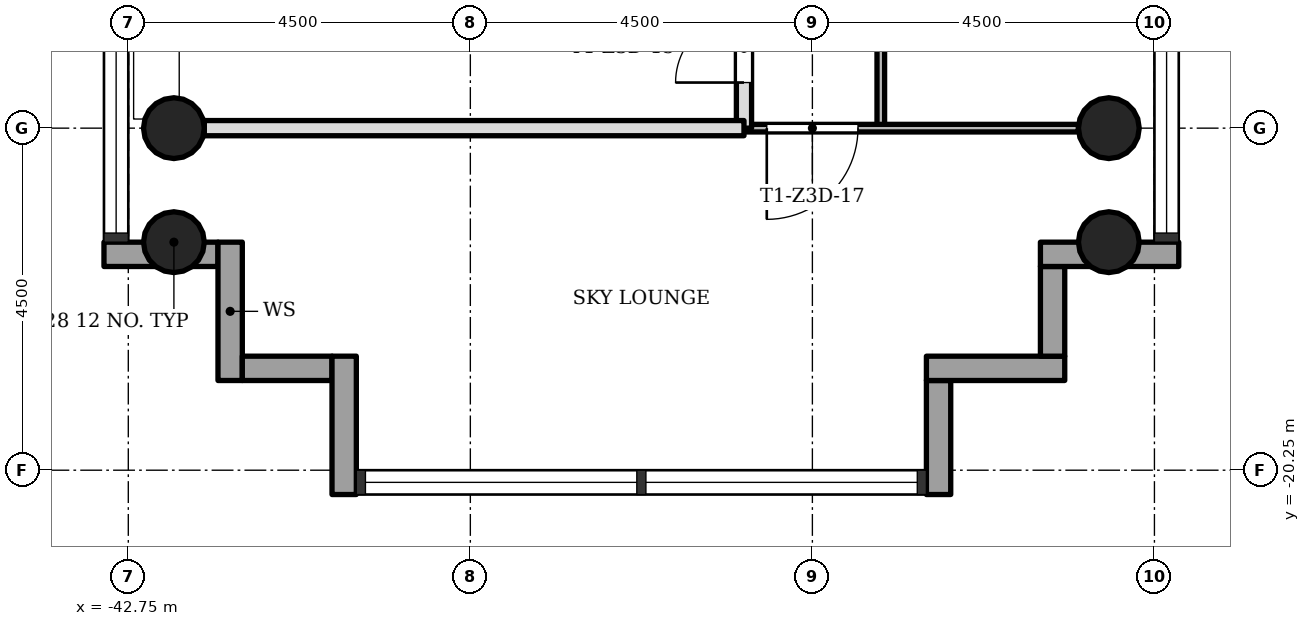
"""IFC4 building model, lengths in metres.
Left out: names, types, materials, properties, quantities, classifications, styles, units other than length and angle.
Written with IfcOpenShell. Run it as: python <this file> out.ifc"""

import sys

from ifc_helpers import new_model, si_unit, direction, frame, frame_2d, origin, origin_2d, place, context, subcontext, project, spatial, rectangle, hollow_circle, extrude, element, fill, save


model = new_model("IFC4")
c1 = context("Model", 3, precision=1e-05, world=origin(), true_north=direction((0.0, 1.0)))
c2 = subcontext(c1, "Body", "Model", "MODEL_VIEW")
j1 = project(units=[si_unit("LENGTHUNIT", "METRE"), si_unit("PLANEANGLEUNIT", "RADIAN")], contexts=[c1])
p1 = place(None, origin())
s1 = spatial("IfcSite", under=j1, at=p1, CompositionType="ELEMENT")
p2 = place(p1, origin())
s2 = spatial("IfcBuilding", under=s1, at=p2, CompositionType="ELEMENT")
p3 = place(p2, frame((0.0, 0.0, 174.5)))
s3 = spatial("IfcBuildingStorey", under=s2, at=p3, CompositionType="ELEMENT", Elevation=174.5)
for number, where, z_axis, x_axis in (
    (1, (-42.15, -15.75, 0.0), (0.0, 0.0, 1.0), (1.0, 0.0, 0.0)),
    (2, (-29.85, -15.75, 0.0), (0.0, 0.0, 1.0), (1.0, 0.0, 0.0)),
    (3, (-42.15, -17.25, 0.0), (0.0, 0.0, 1.0), (1.0, 0.0, 0.0)),
    (4, (-29.85, -17.25, 0.0), (0.0, 0.0, 1.0), (1.0, 0.0, 0.0)),
):
    element("IfcColumn", number, at=place(p3, frame(where, z_axis=z_axis, x_axis=x_axis)), inside=s3, PredefinedType="COLUMN", context=c2, shape_type="SweptSolid", body=[
        extrude(hollow_circle(Radius=0.4, WallThickness=0.028, at=origin_2d()), origin(), (0.0, 0.0, 1.0), 3.4),
    ])
p4 = place(p3, frame((-43.07, -17.41, -0.3), z_axis=(0.0, 0.0, 1.0), x_axis=(1.0, 0.0, 0.0)))
e5 = element("IfcWall", 5, at=p4, inside=s3, PredefinedType="STANDARD", context=c2, shape_type="SweptSolid", body=[
    extrude(rectangle(XDim=1.5, YDim=0.32, at=frame_2d((0.75, 0.0))), origin(), (0.0, 0.0, 1.0), 3.4),
])
p5 = place(p3, frame((-41.41, -17.25, -0.3), z_axis=(0.0, 0.0, 1.0), x_axis=(0.0, -1.0, 0.0)))
e6 = element("IfcWall", 6, at=p5, inside=s3, PredefinedType="STANDARD", context=c2, shape_type="SweptSolid", body=[
    extrude(rectangle(XDim=1.82, YDim=0.32, at=frame_2d((0.91, 0.0))), origin(), (0.0, 0.0, 1.0), 3.4),
])
p6 = place(p3, frame((-41.25, -18.91, -0.3), z_axis=(0.0, 0.0, 1.0), x_axis=(1.0, 0.0, 0.0)))
e7 = element("IfcWall", 7, at=p6, inside=s3, PredefinedType="STANDARD", context=c2, shape_type="SweptSolid", body=[
    extrude(rectangle(XDim=1.18, YDim=0.32, at=frame_2d((0.59, 0.0))), origin(), (0.0, 0.0, 1.0), 3.4),
])
p7 = place(p3, frame((-39.91, -18.75, -0.3), z_axis=(0.0, 0.0, 1.0), x_axis=(0.0, -1.0, 0.0)))
e8 = element("IfcWall", 8, at=p7, inside=s3, PredefinedType="STANDARD", context=c2, shape_type="SweptSolid", body=[
    extrude(rectangle(XDim=1.82, YDim=0.32, at=frame_2d((0.91, 0.0))), origin(), (0.0, 0.0, 1.0), 3.4),
])
p8 = place(p3, frame((-32.09, -20.57, -0.3), z_axis=(0.0, 0.0, 1.0), x_axis=(0.0, 1.0, 0.0)))
e9 = element("IfcWall", 9, at=p8, inside=s3, PredefinedType="STANDARD", context=c2, shape_type="SweptSolid", body=[
    extrude(rectangle(XDim=1.5, YDim=0.32, at=frame_2d((0.75, 0.0))), origin(), (0.0, 0.0, 1.0), 3.4),
])
p9 = place(p3, frame((-32.25, -18.91, -0.3), z_axis=(0.0, 0.0, 1.0), x_axis=(1.0, 0.0, 0.0)))
e10 = element("IfcWall", 10, at=p9, inside=s3, PredefinedType="STANDARD", context=c2, shape_type="SweptSolid", body=[
    extrude(rectangle(XDim=1.82, YDim=0.32, at=frame_2d((0.91, 0.0))), origin(), (0.0, 0.0, 1.0), 3.4),
])
p10 = place(p3, frame((-30.59, -18.75, -0.3), z_axis=(0.0, 0.0, 1.0), x_axis=(0.0, 1.0, 0.0)))
e11 = element("IfcWall", 11, at=p10, inside=s3, PredefinedType="STANDARD", context=c2, shape_type="SweptSolid", body=[
    extrude(rectangle(XDim=1.18, YDim=0.32, at=frame_2d((0.59, 0.0))), origin(), (0.0, 0.0, 1.0), 3.4),
])
p11 = place(p3, frame((-30.75, -17.41, -0.3), z_axis=(0.0, 0.0, 1.0), x_axis=(1.0, 0.0, 0.0)))
e12 = element("IfcWall", 12, at=p11, inside=s3, PredefinedType="STANDARD", context=c2, shape_type="SweptSolid", body=[
    extrude(rectangle(XDim=1.82, YDim=0.32, at=frame_2d((0.91, 0.0))), origin(), (0.0, 0.0, 1.0), 3.4),
])
p12 = place(p3, frame((-34.65, -15.75, 0.0), z_axis=(0.0, 0.0, 1.0), x_axis=(0.0, 1.0, 0.0)))
e13 = element("IfcWall", 13, at=p12, inside=s3, PredefinedType="SOLIDWALL", context=c2, shape_type="SweptSolid", body=[
    extrude(rectangle(XDim=4.5, YDim=0.2, at=frame_2d((2.25, 0.0))), origin(), (0.0, 0.0, 1.0), 3.0),
])
p13 = place(p12, frame((0.6, 0.0, 0.0)))
e14 = element("IfcOpeningElement", 14, at=p13, cuts=e13, PredefinedType="OPENING", context=c2, shape_type="SweptSolid", body=[
    extrude(rectangle(XDim=0.9, YDim=2.1, at=frame_2d((0.45, 1.05))), frame((0.0, 0.11, 0.0), z_axis=(0.0, -1.0, 0.0), x_axis=(1.0, 0.0, 0.0)), (0.0, 0.0, 1.0), 0.22),
])
p14 = place(p3, frame((-32.85, -15.75, 0.0), z_axis=(0.0, 0.0, 1.0), x_axis=(0.0, 1.0, 0.0)))
e15 = element("IfcWall", 15, at=p14, inside=s3, PredefinedType="PARTITIONING", context=c2, shape_type="SweptSolid", body=[
    extrude(rectangle(XDim=9.0, YDim=0.1, at=frame_2d((4.5, 0.0))), origin(), (0.0, 0.0, 1.0), 3.0),
])
p15 = place(p14, frame((5.55, 0.0, 0.0)))
e16 = element("IfcOpeningElement", 16, at=p15, cuts=e15, PredefinedType="OPENING", context=c2, shape_type="SweptSolid", body=[
    extrude(rectangle(XDim=0.9, YDim=2.1, at=frame_2d((0.45, 1.05))), frame((0.0, 0.06, 0.0), z_axis=(0.0, -1.0, 0.0), x_axis=(1.0, 0.0, 0.0)), (0.0, 0.0, 1.0), 0.12),
])
p16 = place(p3, frame((-34.65, -15.75, 0.0), z_axis=(0.0, 0.0, 1.0), x_axis=(1.0, 0.0, 0.0)))
e17 = element("IfcWall", 17, at=p16, inside=s3, PredefinedType="PARTITIONING", context=c2, shape_type="SweptSolid", body=[
    extrude(rectangle(XDim=4.4, YDim=0.1, at=frame_2d((2.2, 0.0))), origin(), (0.0, 0.0, 1.0), 3.0),
])
p17 = place(p16, frame((0.3, 0.0, 0.0)))
e18 = element("IfcOpeningElement", 18, at=p17, cuts=e17, PredefinedType="OPENING", context=c2, shape_type="SweptSolid", body=[
    extrude(rectangle(XDim=1.2, YDim=2.1, at=frame_2d((0.6, 1.05))), frame((0.0, 0.06, 0.0), z_axis=(0.0, -1.0, 0.0), x_axis=(1.0, 0.0, 0.0)), (0.0, 0.0, 1.0), 0.12),
])
p18 = place(p3, frame((-41.75, -15.75, 0.0), z_axis=(0.0, 0.0, 1.0), x_axis=(1.0, 0.0, 0.0)))
e19 = element("IfcWall", 19, at=p18, inside=s3, PredefinedType="SOLIDWALL", context=c2, shape_type="SweptSolid", body=[
    extrude(rectangle(XDim=7.1, YDim=0.2, at=frame_2d((3.55, 0.0))), origin(), (0.0, 0.0, 1.0), 3.0),
])
p19 = place(p13, origin())
e20 = element("IfcDoor", 20, at=p19, inside=s3, OperationType="SINGLE_SWING_RIGHT", PredefinedType="DOOR", context=c2, shape_type="SweptSolid", body=[
    extrude(rectangle(XDim=0.9, YDim=2.1, at=frame_2d((0.45, 1.05))), frame((0.0, 0.025, 0.0), z_axis=(0.0, -1.0, 0.0), x_axis=(1.0, 0.0, 0.0)), (0.0, 0.0, 1.0), 0.05),
])
fill(e14, e20)
p20 = place(p17, origin())
e21 = element("IfcDoor", 21, at=p20, inside=s3, OperationType="SINGLE_SWING_LEFT", PredefinedType="DOOR", context=c2, shape_type="SweptSolid", body=[
    extrude(rectangle(XDim=1.2, YDim=2.1, at=frame_2d((0.6, 1.05))), frame((0.0, 0.025, 0.0), z_axis=(0.0, -1.0, 0.0), x_axis=(1.0, 0.0, 0.0)), (0.0, 0.0, 1.0), 0.05),
])
fill(e18, e21)
save(model, sys.argv[1])
